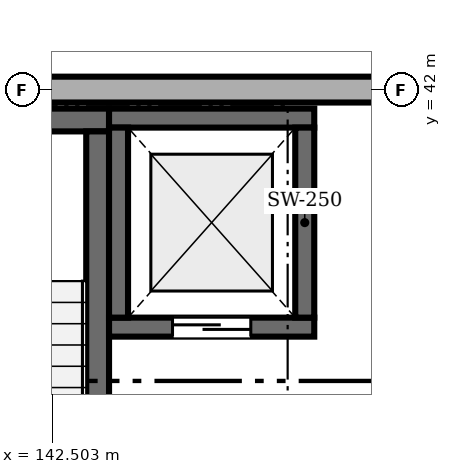
"""IFC4 building model, lengths in metres.
Left out: names, types, materials, properties, quantities, classifications, styles, units other than length and angle.
Written with IfcOpenShell. Run it as: python <this file> out.ifc"""

import sys

from ifc_helpers import new_model, si_unit, direction, frame, frame_2d, origin, place, context, subcontext, project, spatial, rectangle, extrude, element, fill, save


model = new_model("IFC4")
c1 = context("Model", 3, precision=1e-05, world=origin(), true_north=direction((0.0, 1.0)))
c2 = subcontext(c1, "Body", "Model", "MODEL_VIEW")
j1 = project(units=[si_unit("LENGTHUNIT", "METRE"), si_unit("PLANEANGLEUNIT", "RADIAN")], contexts=[c1])
p1 = place(None, origin())
s1 = spatial("IfcSite", under=j1, at=p1, CompositionType="ELEMENT")
p2 = place(p1, origin())
s2 = spatial("IfcBuilding", under=s1, at=p2, CompositionType="ELEMENT")
p3 = place(p2, origin())
s3 = spatial("IfcBuildingStorey", under=s2, at=p3, CompositionType="ELEMENT", Elevation=0.0)
p4 = place(p3, frame((139.2, 41.6, 0.0), z_axis=(0.0, 0.0, 1.0), x_axis=(1.0, 0.0, 0.0)))
e1 = element("IfcWall", 1, at=p4, inside=s3, PredefinedType="SHEAR", context=c2, shape_type="SweptSolid", body=[
    extrude(rectangle(XDim=4.05, YDim=0.3, at=frame_2d((2.025, 0.0))), origin(), (0.0, 0.0, 1.0), 5.18),
])
p5 = place(p3, frame((143.1, 33.55, 0.0), z_axis=(0.0, 0.0, 1.0), x_axis=(0.0, 1.0, 0.0)))
e2 = element("IfcWall", 2, at=p5, inside=s3, PredefinedType="SHEAR", context=c2, shape_type="SweptSolid", body=[
    extrude(rectangle(XDim=7.9, YDim=0.3, at=frame_2d((3.95, 0.0))), origin(), (0.0, 0.0, 1.0), 5.18),
])
p6 = place(p3, frame((143.25, 38.875, 0.0), z_axis=(0.0, 0.0, 1.0), x_axis=(1.0, 0.0, 0.0)))
e3 = element("IfcWall", 3, at=p6, inside=s3, PredefinedType="SHEAR", context=c2, shape_type="SweptSolid", body=[
    extrude(rectangle(XDim=2.7, YDim=0.25, at=frame_2d((1.35, 0.0))), origin(), (0.0, 0.0, 1.0), 5.18),
])
p7 = place(p6, frame((0.835, 0.0, 0.0)))
e4 = element("IfcOpeningElement", 4, at=p7, cuts=e3, PredefinedType="OPENING", context=c2, shape_type="SweptSolid", body=[
    extrude(rectangle(XDim=1.03, YDim=2.15, at=frame_2d((0.515, 1.075))), frame((0.0, 0.135, 0.0), z_axis=(0.0, -1.0, 0.0), x_axis=(1.0, 0.0, 0.0)), (0.0, 0.0, 1.0), 0.27),
])
p8 = place(p3, frame((143.25, 41.625, 0.0), z_axis=(0.0, 0.0, 1.0), x_axis=(1.0, 0.0, 0.0)))
e5 = element("IfcWall", 5, at=p8, inside=s3, PredefinedType="SHEAR", context=c2, shape_type="SweptSolid", body=[
    extrude(rectangle(XDim=2.7, YDim=0.25, at=frame_2d((1.35, 0.0))), origin(), (0.0, 0.0, 1.0), 5.18),
])
for number, where, z_axis, x_axis in (
    (6, (143.375, 39.0, 0.0), (0.0, 0.0, 1.0), (0.0, 1.0, 0.0)),
    (7, (145.825, 39.0, 0.0), (0.0, 0.0, 1.0), (0.0, 1.0, 0.0)),
):
    element("IfcWall", number, at=place(p3, frame(where, z_axis=z_axis, x_axis=x_axis)), inside=s3, PredefinedType="SHEAR", context=c2, shape_type="SweptSolid", body=[
        extrude(rectangle(XDim=2.5, YDim=0.25, at=frame_2d((1.25, 0.0))), origin(), (0.0, 0.0, 1.0), 5.18),
    ])
p9 = place(p3, frame((139.2, 42.0, 0.0), z_axis=(0.0, 0.0, 1.0), x_axis=(1.0, 0.0, 0.0)))
e8 = element("IfcWall", 8, at=p9, inside=s3, PredefinedType="STANDARD", context=c2, shape_type="SweptSolid", body=[
    extrude(rectangle(XDim=7.6, YDim=0.34, at=frame_2d((3.8, 0.0))), origin(), (0.0, 0.0, 1.0), 4.43),
])
p10 = place(p7, origin())
e9 = element("IfcDoor", 9, at=p10, inside=s3, OperationType="SLIDING_TO_LEFT", PredefinedType="DOOR", context=c2, shape_type="SweptSolid", body=[
    extrude(rectangle(XDim=1.03, YDim=2.15, at=frame_2d((0.515, 1.075))), frame((0.0, 0.025, 0.0), z_axis=(0.0, -1.0, 0.0), x_axis=(1.0, 0.0, 0.0)), (0.0, 0.0, 1.0), 0.05),
])
fill(e4, e9)
save(model, sys.argv[1])
